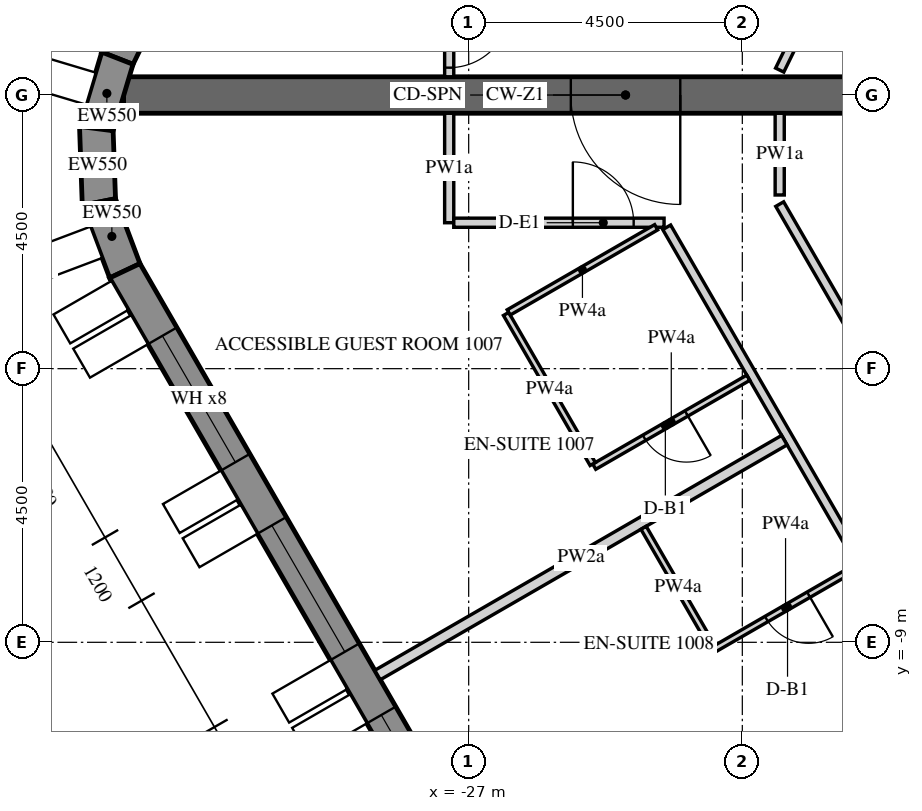
"""IFC4 building model, lengths in metres.
Left out: names, types, materials, properties, quantities, classifications, styles, units other than length and angle.
Written with IfcOpenShell. Run it as: python <this file> out.ifc"""

import sys

from ifc_helpers import new_model, si_unit, direction, frame, frame_2d, origin, place, context, subcontext, project, spatial, polyline, rectangle, outline, extrude, element, fill, save


model = new_model("IFC4")
c1 = context("Model", 3, precision=1e-05, world=origin(), true_north=direction((0.0, 1.0)))
c2 = subcontext(c1, "Body", "Model", "MODEL_VIEW")
j1 = project(units=[si_unit("LENGTHUNIT", "METRE"), si_unit("PLANEANGLEUNIT", "RADIAN")], contexts=[c1])
p1 = place(None, origin())
s1 = spatial("IfcSite", under=j1, at=p1, CompositionType="ELEMENT")
p2 = place(p1, origin())
s2 = spatial("IfcBuilding", under=s1, at=p2, CompositionType="ELEMENT")
p3 = place(p2, frame((0.0, 0.0, 135.0)))
s3 = spatial("IfcBuildingStorey", under=s2, at=p3, CompositionType="ELEMENT", Elevation=135.0)
p4 = place(p3, frame((-19.595, 27.633, -0.15), z_axis=(0.0, 0.0, 1.0), x_axis=(-0.438368285794, -0.898795441694, 0.0)))
e1 = element("IfcWall", 1, at=p4, inside=s3, PredefinedType="SOLIDWALL", context=c2, shape_type="SweptSolid", body=[
    extrude(outline(polyline([(-0.026, -0.275), (30.093, -0.275), (30.048, 0.275), (0.026, 0.275), (-0.026, -0.275)])), origin(), (0.0, 0.0, 1.0), 3.9),
])
p5 = place(p4, frame((1.236, 0.0, 1.05)))
e2 = element("IfcOpeningElement", 2, at=p5, cuts=e1, PredefinedType="OPENING", context=c2, shape_type="SweptSolid", body=[
    extrude(rectangle(XDim=2.4, YDim=2.4, at=frame_2d((1.2, 1.2))), frame((0.0, 0.285, 0.0), z_axis=(0.0, -1.0, 0.0), x_axis=(1.0, 0.0, 0.0)), (0.0, 0.0, 1.0), 0.57),
])
p6 = place(p4, frame((4.835, 0.0, 1.05)))
e3 = element("IfcOpeningElement", 3, at=p6, cuts=e1, PredefinedType="OPENING", context=c2, shape_type="SweptSolid", body=[
    extrude(rectangle(XDim=2.4, YDim=2.4, at=frame_2d((1.2, 1.2))), frame((0.0, 0.285, 0.0), z_axis=(0.0, -1.0, 0.0), x_axis=(1.0, 0.0, 0.0)), (0.0, 0.0, 1.0), 0.57),
])
p7 = place(p4, frame((8.436, 0.0, 1.05)))
e4 = element("IfcOpeningElement", 4, at=p7, cuts=e1, PredefinedType="OPENING", context=c2, shape_type="SweptSolid", body=[
    extrude(rectangle(XDim=2.4, YDim=2.4, at=frame_2d((1.2, 1.2))), frame((0.0, 0.285, 0.0), z_axis=(0.0, -1.0, 0.0), x_axis=(1.0, 0.0, 0.0)), (0.0, 0.0, 1.0), 0.57),
])
p8 = place(p4, frame((12.035, 0.0, 1.05)))
e5 = element("IfcOpeningElement", 5, at=p8, cuts=e1, PredefinedType="OPENING", context=c2, shape_type="SweptSolid", body=[
    extrude(rectangle(XDim=2.4, YDim=2.4, at=frame_2d((1.2, 1.2))), frame((0.0, 0.285, 0.0), z_axis=(0.0, -1.0, 0.0), x_axis=(1.0, 0.0, 0.0)), (0.0, 0.0, 1.0), 0.57),
])
p9 = place(p4, frame((15.635, 0.0, 1.05)))
e6 = element("IfcOpeningElement", 6, at=p9, cuts=e1, PredefinedType="OPENING", context=c2, shape_type="SweptSolid", body=[
    extrude(rectangle(XDim=2.4, YDim=2.4, at=frame_2d((1.2, 1.2))), frame((0.0, 0.285, 0.0), z_axis=(0.0, -1.0, 0.0), x_axis=(1.0, 0.0, 0.0)), (0.0, 0.0, 1.0), 0.57),
])
p10 = place(p4, frame((19.236, 0.0, 1.05)))
e7 = element("IfcOpeningElement", 7, at=p10, cuts=e1, PredefinedType="OPENING", context=c2, shape_type="SweptSolid", body=[
    extrude(rectangle(XDim=2.4, YDim=2.4, at=frame_2d((1.2, 1.2))), frame((0.0, 0.285, 0.0), z_axis=(0.0, -1.0, 0.0), x_axis=(1.0, 0.0, 0.0)), (0.0, 0.0, 1.0), 0.57),
])
p11 = place(p4, frame((22.835, 0.0, 1.05)))
e8 = element("IfcOpeningElement", 8, at=p11, cuts=e1, PredefinedType="OPENING", context=c2, shape_type="SweptSolid", body=[
    extrude(rectangle(XDim=2.4, YDim=2.4, at=frame_2d((1.2, 1.2))), frame((0.0, 0.285, 0.0), z_axis=(0.0, -1.0, 0.0), x_axis=(1.0, 0.0, 0.0)), (0.0, 0.0, 1.0), 0.57),
])
p12 = place(p4, frame((26.436, 0.0, 1.05)))
e9 = element("IfcOpeningElement", 9, at=p12, cuts=e1, PredefinedType="OPENING", context=c2, shape_type="SweptSolid", body=[
    extrude(rectangle(XDim=2.4, YDim=2.4, at=frame_2d((1.2, 1.2))), frame((0.0, 0.285, 0.0), z_axis=(0.0, -1.0, 0.0), x_axis=(1.0, 0.0, 0.0)), (0.0, 0.0, 1.0), 0.57),
])
p13 = place(p3, frame((-32.777, 0.605, -0.15), z_axis=(0.0, 0.0, 1.0), x_axis=(-0.286921497463, -0.957954098219, 0.0)))
e10 = element("IfcWall", 10, at=p13, inside=s3, PredefinedType="SOLIDWALL", context=c2, shape_type="SweptSolid", body=[
    extrude(outline(polyline([(-0.022, -0.275), (1.253, -0.275), (1.163, 0.275), (0.022, 0.275), (-0.022, -0.275)])), origin(), (0.0, 0.0, 1.0), 3.9),
])
p14 = place(p3, frame((-33.124, -0.552, -0.15), z_axis=(0.0, 0.0, 1.0), x_axis=(0.03495638276, -0.999388838893, 0.0)))
e11 = element("IfcWall", 11, at=p14, inside=s3, PredefinedType="SOLIDWALL", context=c2, shape_type="SweptSolid", body=[
    extrude(outline(polyline([(-0.045, -0.275), (1.253, -0.275), (1.163, 0.275), (0.045, 0.275), (-0.045, -0.275)])), origin(), (0.0, 0.0, 1.0), 3.9),
])
p15 = place(p3, frame((-33.081, -1.76, -0.15), z_axis=(0.0, 0.0, 1.0), x_axis=(0.353027214741, -0.935613053378, 0.0)))
e12 = element("IfcWall", 12, at=p15, inside=s3, PredefinedType="SOLIDWALL", context=c2, shape_type="SweptSolid", body=[
    extrude(outline(polyline([(-0.045, -0.275), (1.231, -0.275), (1.186, 0.275), (0.045, 0.275), (-0.045, -0.275)])), origin(), (0.0, 0.0, 1.0), 3.9),
])
p16 = place(p3, frame((-32.655, -2.89, -0.15), z_axis=(0.0, 0.0, 1.0), x_axis=(0.499997711317, -0.866026725152, 0.0)))
e13 = element("IfcWall", 13, at=p16, inside=s3, PredefinedType="SOLIDWALL", context=c2, shape_type="SweptSolid", body=[
    extrude(outline(polyline([(-0.022, -0.275), (30.097, -0.275), (30.045, 0.275), (0.022, 0.275), (-0.022, -0.275)])), origin(), (0.0, 0.0, 1.0), 3.9),
])
p17 = place(p16, frame((1.236, 0.0, 1.05)))
e14 = element("IfcOpeningElement", 14, at=p17, cuts=e13, PredefinedType="OPENING", context=c2, shape_type="SweptSolid", body=[
    extrude(rectangle(XDim=2.4, YDim=2.4, at=frame_2d((1.2, 1.2))), frame((0.0, 0.285, 0.0), z_axis=(0.0, -1.0, 0.0), x_axis=(1.0, 0.0, 0.0)), (0.0, 0.0, 1.0), 0.57),
])
p18 = place(p16, frame((4.835, 0.0, 1.05)))
e15 = element("IfcOpeningElement", 15, at=p18, cuts=e13, PredefinedType="OPENING", context=c2, shape_type="SweptSolid", body=[
    extrude(rectangle(XDim=2.4, YDim=2.4, at=frame_2d((1.2, 1.2))), frame((0.0, 0.285, 0.0), z_axis=(0.0, -1.0, 0.0), x_axis=(1.0, 0.0, 0.0)), (0.0, 0.0, 1.0), 0.57),
])
p19 = place(p16, frame((8.436, 0.0, 1.05)))
e16 = element("IfcOpeningElement", 16, at=p19, cuts=e13, PredefinedType="OPENING", context=c2, shape_type="SweptSolid", body=[
    extrude(rectangle(XDim=2.4, YDim=2.4, at=frame_2d((1.2, 1.2))), frame((0.0, 0.285, 0.0), z_axis=(0.0, -1.0, 0.0), x_axis=(1.0, 0.0, 0.0)), (0.0, 0.0, 1.0), 0.57),
])
p20 = place(p16, frame((12.035, 0.0, 1.05)))
e17 = element("IfcOpeningElement", 17, at=p20, cuts=e13, PredefinedType="OPENING", context=c2, shape_type="SweptSolid", body=[
    extrude(rectangle(XDim=2.4, YDim=2.4, at=frame_2d((1.2, 1.2))), frame((0.0, 0.285, 0.0), z_axis=(0.0, -1.0, 0.0), x_axis=(1.0, 0.0, 0.0)), (0.0, 0.0, 1.0), 0.57),
])
p21 = place(p16, frame((15.635, 0.0, 1.05)))
e18 = element("IfcOpeningElement", 18, at=p21, cuts=e13, PredefinedType="OPENING", context=c2, shape_type="SweptSolid", body=[
    extrude(rectangle(XDim=2.4, YDim=2.4, at=frame_2d((1.2, 1.2))), frame((0.0, 0.285, 0.0), z_axis=(0.0, -1.0, 0.0), x_axis=(1.0, 0.0, 0.0)), (0.0, 0.0, 1.0), 0.57),
])
p22 = place(p16, frame((19.236, 0.0, 1.05)))
e19 = element("IfcOpeningElement", 19, at=p22, cuts=e13, PredefinedType="OPENING", context=c2, shape_type="SweptSolid", body=[
    extrude(rectangle(XDim=2.4, YDim=2.4, at=frame_2d((1.2, 1.2))), frame((0.0, 0.285, 0.0), z_axis=(0.0, -1.0, 0.0), x_axis=(1.0, 0.0, 0.0)), (0.0, 0.0, 1.0), 0.57),
])
p23 = place(p16, frame((22.835, 0.0, 1.05)))
e20 = element("IfcOpeningElement", 20, at=p23, cuts=e13, PredefinedType="OPENING", context=c2, shape_type="SweptSolid", body=[
    extrude(rectangle(XDim=2.4, YDim=2.4, at=frame_2d((1.2, 1.2))), frame((0.0, 0.285, 0.0), z_axis=(0.0, -1.0, 0.0), x_axis=(1.0, 0.0, 0.0)), (0.0, 0.0, 1.0), 0.57),
])
p24 = place(p16, frame((26.436, 0.0, 1.05)))
e21 = element("IfcOpeningElement", 21, at=p24, cuts=e13, PredefinedType="OPENING", context=c2, shape_type="SweptSolid", body=[
    extrude(rectangle(XDim=2.4, YDim=2.4, at=frame_2d((1.2, 1.2))), frame((0.0, 0.285, 0.0), z_axis=(0.0, -1.0, 0.0), x_axis=(1.0, 0.0, 0.0)), (0.0, 0.0, 1.0), 0.57),
])
p25 = place(p3, frame((-16.166, 0.0, -0.15), z_axis=(0.0, 0.0, 1.0), x_axis=(-1.0, 0.0, 0.0)))
e22 = element("IfcWall", 22, at=p25, inside=s3, PredefinedType="SHEAR", context=c2, shape_type="SweptSolid", body=[
    extrude(rectangle(XDim=16.509, YDim=0.6, at=frame_2d((8.254, 0.0))), origin(), (0.0, 0.0, 1.0), 3.9),
])
p26 = place(p25, frame((7.354, 0.0, 0.15)))
e23 = element("IfcOpeningElement", 23, at=p26, cuts=e22, PredefinedType="OPENING", context=c2, shape_type="SweptSolid", body=[
    extrude(rectangle(XDim=1.8, YDim=2.4, at=frame_2d((0.9, 1.2))), frame((0.0, 0.31, 0.0), z_axis=(0.0, -1.0, 0.0), x_axis=(1.0, 0.0, 0.0)), (0.0, 0.0, 1.0), 0.62),
])
p27 = place(p3, frame((-27.32, 2.025, 0.0), z_axis=(0.0, 0.0, 1.0), x_axis=(0.0, -1.0, 0.0)))
e24 = element("IfcWall", 24, at=p27, inside=s3, PredefinedType="PARTITIONING", context=c2, shape_type="SweptSolid", body=[
    extrude(rectangle(XDim=1.725, YDim=0.15, at=frame_2d((0.862, 0.0))), origin(), (0.0, 0.0, 1.0), 2.838),
])
p28 = place(p27, frame((0.575, 0.0, 0.0)))
e25 = element("IfcOpeningElement", 25, at=p28, cuts=e24, PredefinedType="OPENING", context=c2, shape_type="SweptSolid", body=[
    extrude(rectangle(XDim=1.0, YDim=2.1, at=frame_2d((0.5, 1.05))), frame((0.0, 0.085, 0.0), z_axis=(0.0, -1.0, 0.0), x_axis=(1.0, 0.0, 0.0)), (0.0, 0.0, 1.0), 0.17),
])
p29 = place(p3, frame((-21.885, 0.41, 0.0), z_axis=(0.0, 0.0, 1.0), x_axis=(0.43837064471, 0.898794291179, 0.0)))
e26 = element("IfcWall", 26, at=p29, inside=s3, PredefinedType="PARTITIONING", context=c2, shape_type="SweptSolid", body=[
    extrude(rectangle(XDim=9.532, YDim=0.15, at=frame_2d((4.766, 0.0))), origin(), (0.0, 0.0, 1.0), 2.838),
])
p30 = place(p29, frame((4.316, 0.0, 0.0)))
e27 = element("IfcOpeningElement", 27, at=p30, cuts=e26, PredefinedType="OPENING", context=c2, shape_type="SweptSolid", body=[
    extrude(rectangle(XDim=0.9, YDim=2.1, at=frame_2d((0.45, 1.05))), frame((0.0, 0.085, 0.0), z_axis=(0.0, -1.0, 0.0), x_axis=(1.0, 0.0, 0.0)), (0.0, 0.0, 1.0), 0.17),
])
p31 = place(p3, frame((-27.32, -0.3, 0.0), z_axis=(0.0, 0.0, 1.0), x_axis=(0.0, -1.0, 0.0)))
e28 = element("IfcWall", 28, at=p31, inside=s3, PredefinedType="PARTITIONING", context=c2, shape_type="SweptSolid", body=[
    extrude(rectangle(XDim=1.8, YDim=0.15, at=frame_2d((0.9, 0.0))), origin(), (0.0, 0.0, 1.0), 2.838),
])
p32 = place(p3, frame((-27.245, -2.1, 0.0), z_axis=(0.0, 0.0, 1.0), x_axis=(1.0, 0.0, 0.0)))
e29 = element("IfcWall", 29, at=p32, inside=s3, PredefinedType="PARTITIONING", context=c2, shape_type="SweptSolid", body=[
    extrude(rectangle(XDim=3.458, YDim=0.15, at=frame_2d((1.729, 0.0))), origin(), (0.0, 0.0, 1.0), 2.838),
])
p33 = place(p32, frame((1.958, 0.0, 0.0)))
e30 = element("IfcOpeningElement", 30, at=p33, cuts=e29, PredefinedType="OPENING", context=c2, shape_type="SweptSolid", body=[
    extrude(rectangle(XDim=1.0, YDim=2.1, at=frame_2d((0.5, 1.05))), frame((0.0, 0.085, 0.0), z_axis=(0.0, -1.0, 0.0), x_axis=(1.0, 0.0, 0.0)), (0.0, 0.0, 1.0), 0.17),
])
p34 = place(p3, frame((-23.743, -2.175, 0.0), z_axis=(0.0, 0.0, 1.0), x_axis=(0.499992353047, -0.86602981871, 0.0)))
e31 = element("IfcWall", 31, at=p34, inside=s3, PredefinedType="PARTITIONING", context=c2, shape_type="SweptSolid", body=[
    extrude(rectangle(XDim=23.516, YDim=0.15, at=frame_2d((11.758, 0.0))), origin(), (0.0, 0.0, 1.0), 2.838),
])
p35 = place(p34, frame((10.099, 0.0, 0.0)))
e32 = element("IfcOpeningElement", 32, at=p35, cuts=e31, PredefinedType="OPENING", context=c2, shape_type="SweptSolid", body=[
    extrude(rectangle(XDim=1.0, YDim=2.1, at=frame_2d((0.5, 1.05))), frame((0.0, 0.085, 0.0), z_axis=(0.0, -1.0, 0.0), x_axis=(1.0, 0.0, 0.0)), (0.0, 0.0, 1.0), 0.17),
])
p36 = place(p34, frame((17.358, 0.0, 0.0)))
e33 = element("IfcOpeningElement", 33, at=p36, cuts=e31, PredefinedType="OPENING", context=c2, shape_type="SweptSolid", body=[
    extrude(rectangle(XDim=1.0, YDim=2.1, at=frame_2d((0.5, 1.05))), frame((0.0, 0.085, 0.0), z_axis=(0.0, -1.0, 0.0), x_axis=(1.0, 0.0, 0.0)), (0.0, 0.0, 1.0), 0.17),
])
p37 = place(p3, frame((-17.768, -8.926, 0.0), z_axis=(0.0, 0.0, 1.0), x_axis=(-0.499997033681, 0.866027116383, 0.0)))
e34 = element("IfcWall", 34, at=p37, inside=s3, PredefinedType="PARTITIONING", context=c2, shape_type="SweptSolid", body=[
    extrude(rectangle(XDim=8.235, YDim=0.15, at=frame_2d((4.118, 0.0))), origin(), (0.0, 0.0, 1.0), 2.838),
])
p38 = place(p37, frame((3.668, 0.0, 0.0)))
e35 = element("IfcOpeningElement", 35, at=p38, cuts=e34, PredefinedType="OPENING", context=c2, shape_type="SweptSolid", body=[
    extrude(rectangle(XDim=0.9, YDim=2.1, at=frame_2d((0.45, 1.05))), frame((0.0, 0.085, 0.0), z_axis=(0.0, -1.0, 0.0), x_axis=(1.0, 0.0, 0.0)), (0.0, 0.0, 1.0), 0.17),
])
p39 = place(p3, frame((-21.885, -1.644, 0.0), z_axis=(0.0, 0.0, 1.0), x_axis=(0.0, 1.0, 0.0)))
e36 = element("IfcWall", 36, at=p39, inside=s3, PredefinedType="PARTITIONING", context=c2, shape_type="SweptSolid", body=[
    extrude(rectangle(XDim=1.344, YDim=0.15, at=frame_2d((0.672, 0.0))), origin(), (0.0, 0.0, 1.0), 2.838),
])
p40 = place(p3, frame((-22.402, -4.649, 0.0), z_axis=(0.0, 0.0, 1.0), x_axis=(-0.865989585315, -0.500062034277, 0.0)))
e37 = element("IfcWall", 37, at=p40, inside=s3, PredefinedType="PARTITIONING", context=c2, shape_type="SweptSolid", body=[
    extrude(rectangle(XDim=2.925, YDim=0.1, at=frame_2d((1.462, 0.0))), origin(), (0.0, 0.0, 1.0), 2.838),
])
p41 = place(p40, frame((1.175, 0.0, 0.0)))
e38 = element("IfcOpeningElement", 38, at=p41, cuts=e37, PredefinedType="OPENING", context=c2, shape_type="SweptSolid", body=[
    extrude(rectangle(XDim=0.8, YDim=2.1, at=frame_2d((0.4, 1.05))), frame((0.0, 0.06, 0.0), z_axis=(0.0, -1.0, 0.0), x_axis=(1.0, 0.0, 0.0)), (0.0, 0.0, 1.0), 0.12),
])
p42 = place(p3, frame((-24.96, -6.068, 0.0), z_axis=(0.0, 0.0, 1.0), x_axis=(-0.500036373335, 0.866004402611, 0.0)))
e39 = element("IfcWall", 39, at=p42, inside=s3, PredefinedType="PARTITIONING", context=c2, shape_type="SweptSolid", body=[
    extrude(rectangle(XDim=2.85, YDim=0.1, at=frame_2d((1.425, 0.0))), origin(), (0.0, 0.0, 1.0), 2.838),
])
p43 = place(p3, frame((-26.342, -3.575, 0.0), z_axis=(0.0, 0.0, 1.0), x_axis=(0.866034573852, 0.49998411664, 0.0)))
e40 = element("IfcWall", 40, at=p43, inside=s3, PredefinedType="PARTITIONING", context=c2, shape_type="SweptSolid", body=[
    extrude(rectangle(XDim=2.8, YDim=0.1, at=frame_2d((1.4, 0.0))), origin(), (0.0, 0.0, 1.0), 2.838),
])
p44 = place(p3, frame((-28.499, -9.538, 0.0), z_axis=(0.0, 0.0, 1.0), x_axis=(0.866040859435, 0.499973229072, 0.0)))
e41 = element("IfcWall", 41, at=p44, inside=s3, PredefinedType="PARTITIONING", context=c2, shape_type="SweptSolid", body=[
    extrude(rectangle(XDim=7.725, YDim=0.18, at=frame_2d((3.863, 0.0))), origin(), (0.0, 0.0, 1.0), 2.838),
])
p45 = place(p3, frame((-20.609, -7.754, 0.0), z_axis=(0.0, 0.0, 1.0), x_axis=(-0.866012511928, -0.500022328685, 0.0)))
e42 = element("IfcWall", 42, at=p45, inside=s3, PredefinedType="PARTITIONING", context=c2, shape_type="SweptSolid", body=[
    extrude(rectangle(XDim=2.725, YDim=0.1, at=frame_2d((1.363, 0.0))), origin(), (0.0, 0.0, 1.0), 2.838),
])
p46 = place(p45, frame((0.925, 0.0, 0.0)))
e43 = element("IfcOpeningElement", 43, at=p46, cuts=e42, PredefinedType="OPENING", context=c2, shape_type="SweptSolid", body=[
    extrude(rectangle(XDim=0.8, YDim=2.1, at=frame_2d((0.4, 1.05))), frame((0.0, 0.06, 0.0), z_axis=(0.0, -1.0, 0.0), x_axis=(1.0, 0.0, 0.0)), (0.0, 0.0, 1.0), 0.12),
])
p47 = place(p3, frame((-22.994, -9.073, 0.0), z_axis=(0.0, 0.0, 1.0), x_axis=(-0.4999967785, 0.866027263711, 0.0)))
e44 = element("IfcWall", 44, at=p47, inside=s3, PredefinedType="PARTITIONING", context=c2, shape_type="SweptSolid", body=[
    extrude(rectangle(XDim=2.26, YDim=0.1, at=frame_2d((1.13, 0.0))), origin(), (0.0, 0.0, 1.0), 2.838),
])
p48 = place(p17, frame((0.0, 0.205, 0.0)))
e45 = element("IfcWindow", 45, at=p48, inside=s3, PartitioningType="DOUBLE_PANEL_VERTICAL", PredefinedType="WINDOW", context=c2, shape_type="SweptSolid", body=[
    extrude(rectangle(XDim=2.4, YDim=2.4, at=frame_2d((1.2, 1.2))), frame((0.0, 0.03, 0.0), z_axis=(0.0, -1.0, 0.0), x_axis=(1.0, 0.0, 0.0)), (0.0, 0.0, 1.0), 0.06),
])
fill(e14, e45)
p49 = place(p18, frame((0.0, 0.205, 0.0)))
e46 = element("IfcWindow", 46, at=p49, inside=s3, PartitioningType="DOUBLE_PANEL_VERTICAL", PredefinedType="WINDOW", context=c2, shape_type="SweptSolid", body=[
    extrude(rectangle(XDim=2.4, YDim=2.4, at=frame_2d((1.2, 1.2))), frame((0.0, 0.03, 0.0), z_axis=(0.0, -1.0, 0.0), x_axis=(1.0, 0.0, 0.0)), (0.0, 0.0, 1.0), 0.06),
])
fill(e15, e46)
p50 = place(p19, frame((0.0, 0.205, 0.0)))
e47 = element("IfcWindow", 47, at=p50, inside=s3, PartitioningType="DOUBLE_PANEL_VERTICAL", PredefinedType="WINDOW", context=c2, shape_type="SweptSolid", body=[
    extrude(rectangle(XDim=2.4, YDim=2.4, at=frame_2d((1.2, 1.2))), frame((0.0, 0.03, 0.0), z_axis=(0.0, -1.0, 0.0), x_axis=(1.0, 0.0, 0.0)), (0.0, 0.0, 1.0), 0.06),
])
fill(e16, e47)
p51 = place(p26, origin())
e48 = element("IfcDoor", 48, at=p51, inside=s3, OperationType="DOUBLE_DOOR_SINGLE_SWING", PredefinedType="DOOR", context=c2, shape_type="SweptSolid", body=[
    extrude(rectangle(XDim=1.8, YDim=2.4, at=frame_2d((0.9, 1.2))), frame((0.0, 0.025, 0.0), z_axis=(0.0, -1.0, 0.0), x_axis=(1.0, 0.0, 0.0)), (0.0, 0.0, 1.0), 0.05),
])
fill(e23, e48)
p52 = place(p28, origin())
e49 = element("IfcDoor", 49, at=p52, inside=s3, OperationType="SINGLE_SWING_LEFT", PredefinedType="DOOR", context=c2, shape_type="SweptSolid", body=[
    extrude(rectangle(XDim=1.0, YDim=2.1, at=frame_2d((0.5, 1.05))), frame((0.0, 0.025, 0.0), z_axis=(0.0, -1.0, 0.0), x_axis=(1.0, 0.0, 0.0)), (0.0, 0.0, 1.0), 0.05),
])
fill(e25, e49)
p53 = place(p33, origin())
e50 = element("IfcDoor", 50, at=p53, inside=s3, OperationType="SINGLE_SWING_LEFT", PredefinedType="DOOR", context=c2, shape_type="SweptSolid", body=[
    extrude(rectangle(XDim=1.0, YDim=2.1, at=frame_2d((0.5, 1.05))), frame((0.0, 0.025, 0.0), z_axis=(0.0, -1.0, 0.0), x_axis=(1.0, 0.0, 0.0)), (0.0, 0.0, 1.0), 0.05),
])
fill(e30, e50)
p54 = place(p41, origin())
e51 = element("IfcDoor", 51, at=p54, inside=s3, OperationType="SINGLE_SWING_LEFT", PredefinedType="DOOR", context=c2, shape_type="SweptSolid", body=[
    extrude(rectangle(XDim=0.8, YDim=2.1, at=frame_2d((0.4, 1.05))), frame((0.0, 0.025, 0.0), z_axis=(0.0, -1.0, 0.0), x_axis=(1.0, 0.0, 0.0)), (0.0, 0.0, 1.0), 0.05),
])
fill(e38, e51)
p55 = place(p46, origin())
e52 = element("IfcDoor", 52, at=p55, inside=s3, OperationType="SINGLE_SWING_RIGHT", PredefinedType="DOOR", context=c2, shape_type="SweptSolid", body=[
    extrude(rectangle(XDim=0.8, YDim=2.1, at=frame_2d((0.4, 1.05))), frame((0.0, 0.025, 0.0), z_axis=(0.0, -1.0, 0.0), x_axis=(1.0, 0.0, 0.0)), (0.0, 0.0, 1.0), 0.05),
])
fill(e43, e52)
save(model, sys.argv[1])
